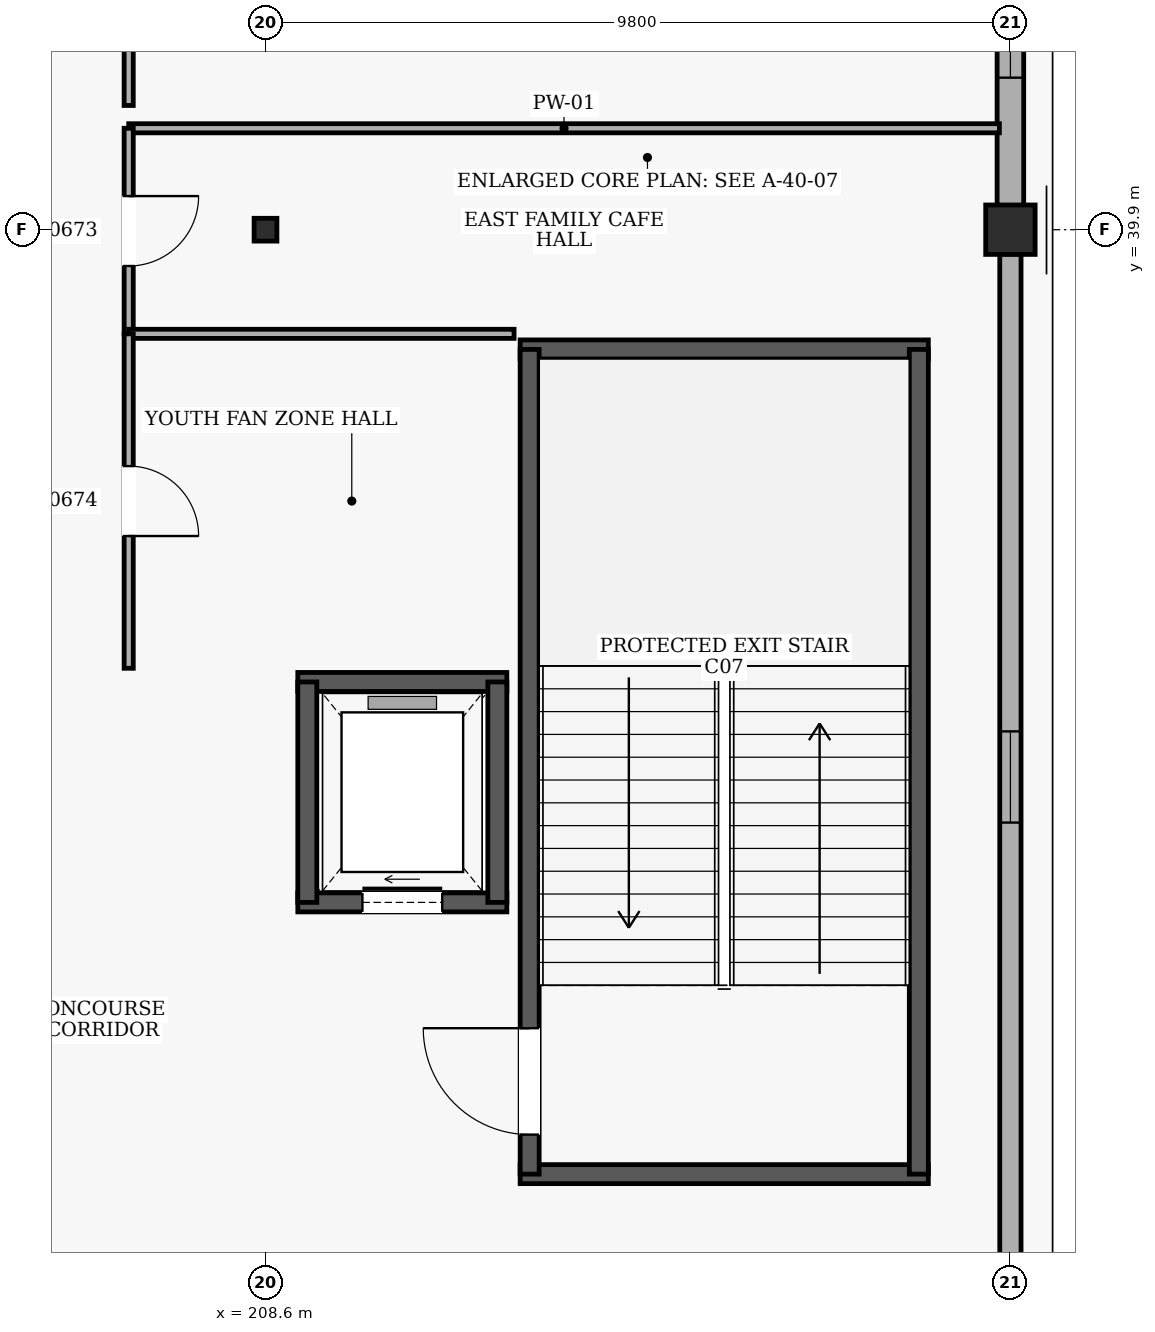
"""IFC4 building model, lengths in metres.
Left out: names, types, materials, properties, quantities, classifications, styles, units other than length and angle.
Written with IfcOpenShell. Run it as: python <this file> out.ifc"""

import sys

from ifc_helpers import new_model, si_unit, direction, frame, frame_2d, origin, origin_2d, place, context, subcontext, project, spatial, rectangle, hollow_rectangle, extrude, element, fill, save


model = new_model("IFC4")
c1 = context("Model", 3, precision=1e-05, world=origin(), true_north=direction((0.0, 1.0)))
c2 = subcontext(c1, "Body", "Model", "MODEL_VIEW")
j1 = project(units=[si_unit("LENGTHUNIT", "METRE"), si_unit("PLANEANGLEUNIT", "RADIAN")], contexts=[c1])
p1 = place(None, origin())
s1 = spatial("IfcSite", under=j1, at=p1, CompositionType="ELEMENT")
p2 = place(p1, origin())
s2 = spatial("IfcBuilding", under=s1, at=p2, CompositionType="ELEMENT")
p3 = place(p2, frame((0.0, 0.0, 15.0)))
s3 = spatial("IfcBuildingStorey", under=s2, at=p3, CompositionType="ELEMENT", Elevation=15.0)
p4 = place(p3, frame((208.6, 39.9, 0.0), z_axis=(0.0, 0.0, 1.0), x_axis=(1.0, 0.0, 0.0)))
e1 = element("IfcColumn", 1, at=p4, inside=s3, PredefinedType="COLUMN", context=c2, shape_type="SweptSolid", body=[
    extrude(hollow_rectangle(XDim=0.3, YDim=0.3, WallThickness=0.016, at=origin_2d()), origin(), (0.0, 0.0, 1.0), 4.8),
])
p5 = place(p3, frame((218.4, 39.9, 0.0), z_axis=(0.0, 0.0, 1.0), x_axis=(1.0, 0.0, 0.0)))
e2 = element("IfcColumn", 2, at=p5, inside=s3, PredefinedType="COLUMN", context=c2, shape_type="SweptSolid", body=[
    extrude(rectangle(XDim=0.65, YDim=0.65, at=origin_2d()), origin(), (0.0, 0.0, 1.0), 4.8),
])
p6 = place(p3, frame((218.4, 46.78, 0.0), z_axis=(0.0, 0.0, 1.0), x_axis=(0.0, -1.0, 0.0)))
e3 = element("IfcWall", 3, at=p6, inside=s3, PredefinedType="SOLIDWALL", context=c2, shape_type="SweptSolid", body=[
    extrude(rectangle(XDim=6.56, YDim=0.35, at=frame_2d((3.28, 0.0))), origin(), (0.0, 0.0, 1.0), 3.88),
])
p7 = place(p6, frame((1.68, 0.0, 0.9)))
e4 = element("IfcOpeningElement", 4, at=p7, cuts=e3, PredefinedType="OPENING", context=c2, shape_type="SweptSolid", body=[
    extrude(rectangle(XDim=3.2, YDim=2.4, at=frame_2d((1.6, 1.2))), frame((0.0, 0.185, 0.0), z_axis=(0.0, -1.0, 0.0), x_axis=(1.0, 0.0, 0.0)), (0.0, 0.0, 1.0), 0.37),
])
p8 = place(p3, frame((218.4, 39.58, 0.0), z_axis=(0.0, 0.0, 1.0), x_axis=(0.0, -1.0, 0.0)))
e5 = element("IfcWall", 5, at=p8, inside=s3, PredefinedType="SOLIDWALL", context=c2, shape_type="SweptSolid", body=[
    extrude(rectangle(XDim=13.76, YDim=0.28, at=frame_2d((6.88, 0.0))), origin(), (0.0, 0.0, 1.0), 3.58),
])
p9 = place(p8, frame((6.28, 0.0, 0.9)))
e6 = element("IfcOpeningElement", 6, at=p9, cuts=e5, PredefinedType="OPENING", context=c2, shape_type="SweptSolid", body=[
    extrude(rectangle(XDim=1.2, YDim=1.5, at=frame_2d((0.6, 0.75))), frame((0.0, 0.15, 0.0), z_axis=(0.0, -1.0, 0.0), x_axis=(1.0, 0.0, 0.0)), (0.0, 0.0, 1.0), 0.3),
])
for number, where, z_axis, x_axis in (
    (7, (211.95, 27.475, 0.0), (0.0, 0.0, 1.0), (1.0, 0.0, 0.0)),
    (8, (217.32, 38.325, 0.0), (0.0, 0.0, 1.0), (-1.0, 0.0, 0.0)),
):
    element("IfcWall", number, at=place(p3, frame(where, z_axis=z_axis, x_axis=x_axis)), inside=s3, PredefinedType="SHEAR", context=c2, shape_type="SweptSolid", body=[
        extrude(rectangle(XDim=5.37, YDim=0.25, at=frame_2d((2.685, 0.0))), origin(), (0.0, 0.0, 1.0), 4.5),
    ])
p10 = place(p3, frame((212.075, 27.475, 0.0), z_axis=(0.0, 0.0, 1.0), x_axis=(0.0, 1.0, 0.0)))
e9 = element("IfcWall", 9, at=p10, inside=s3, PredefinedType="SHEAR", context=c2, shape_type="SweptSolid", body=[
    extrude(rectangle(XDim=10.85, YDim=0.25, at=frame_2d((5.425, 0.0))), origin(), (0.0, 0.0, 1.0), 4.5),
])
p11 = place(p10, frame((0.52, 0.0, 0.0)))
e10 = element("IfcOpeningElement", 10, at=p11, cuts=e9, PredefinedType="OPENING", context=c2, shape_type="SweptSolid", body=[
    extrude(rectangle(XDim=1.4, YDim=2.15, at=frame_2d((0.7, 1.075))), frame((0.0, 0.135, 0.0), z_axis=(0.0, -1.0, 0.0), x_axis=(1.0, 0.0, 0.0)), (0.0, 0.0, 1.0), 0.27),
])
p12 = place(p3, frame((217.195, 27.475, 0.0), z_axis=(0.0, 0.0, 1.0), x_axis=(0.0, 1.0, 0.0)))
e11 = element("IfcWall", 11, at=p12, inside=s3, PredefinedType="SHEAR", context=c2, shape_type="SweptSolid", body=[
    extrude(rectangle(XDim=10.85, YDim=0.25, at=frame_2d((5.425, 0.0))), origin(), (0.0, 0.0, 1.0), 4.5),
])
p13 = place(p3, frame((209.025, 31.05, 0.0), z_axis=(0.0, 0.0, 1.0), x_axis=(1.0, 0.0, 0.0)))
e12 = element("IfcWall", 12, at=p13, inside=s3, PredefinedType="SHEAR", context=c2, shape_type="SweptSolid", body=[
    extrude(rectangle(XDim=2.75, YDim=0.25, at=frame_2d((1.375, 0.0))), origin(), (0.0, 0.0, 1.0), 4.5),
])
p14 = place(p13, frame((0.85, 0.0, 0.0)))
e13 = element("IfcOpeningElement", 13, at=p14, cuts=e12, PredefinedType="OPENING", context=c2, shape_type="SweptSolid", body=[
    extrude(rectangle(XDim=1.05, YDim=2.15, at=frame_2d((0.525, 1.075))), frame((0.0, 0.135, 0.0), z_axis=(0.0, -1.0, 0.0), x_axis=(1.0, 0.0, 0.0)), (0.0, 0.0, 1.0), 0.27),
])
p15 = place(p3, frame((211.775, 33.95, 0.0), z_axis=(0.0, 0.0, 1.0), x_axis=(-1.0, 0.0, 0.0)))
e14 = element("IfcWall", 14, at=p15, inside=s3, PredefinedType="SHEAR", context=c2, shape_type="SweptSolid", body=[
    extrude(rectangle(XDim=2.75, YDim=0.25, at=frame_2d((1.375, 0.0))), origin(), (0.0, 0.0, 1.0), 4.5),
])
for number, where, z_axis, x_axis in (
    (15, (209.15, 33.95, 0.0), (0.0, 0.0, 1.0), (0.0, -1.0, 0.0)),
    (16, (211.65, 31.05, 0.0), (0.0, 0.0, 1.0), (0.0, 1.0, 0.0)),
):
    element("IfcWall", number, at=place(p3, frame(where, z_axis=z_axis, x_axis=x_axis)), inside=s3, PredefinedType="SHEAR", context=c2, shape_type="SweptSolid", body=[
        extrude(rectangle(XDim=2.9, YDim=0.25, at=frame_2d((1.45, 0.0))), origin(), (0.0, 0.0, 1.0), 4.5),
    ])
p16 = place(p3, frame((218.255, 41.234, 0.0), z_axis=(0.0, 0.0, 1.0), x_axis=(-1.0, 0.0, 0.0)))
e17 = element("IfcWall", 17, at=p16, inside=s3, PredefinedType="PARTITIONING", context=c2, shape_type="SweptSolid", body=[
    extrude(rectangle(XDim=11.455, YDim=0.12, at=frame_2d((5.728, 0.0))), origin(), (0.0, 0.0, 1.0), 4.5),
])
p17 = place(p3, frame((206.8, 41.234, 0.0), z_axis=(0.0, 0.0, 1.0), x_axis=(0.0, -1.0, 0.0)))
e18 = element("IfcWall", 18, at=p17, inside=s3, PredefinedType="PARTITIONING", context=c2, shape_type="SweptSolid", body=[
    extrude(rectangle(XDim=2.704, YDim=0.12, at=frame_2d((1.352, 0.0))), origin(), (0.0, 0.0, 1.0), 4.5),
])
p18 = place(p17, frame((0.892, 0.0, 0.0)))
e19 = element("IfcOpeningElement", 19, at=p18, cuts=e18, PredefinedType="OPENING", context=c2, shape_type="SweptSolid", body=[
    extrude(rectangle(XDim=0.92, YDim=2.1, at=frame_2d((0.46, 1.05))), frame((0.0, 0.07, 0.0), z_axis=(0.0, -1.0, 0.0), x_axis=(1.0, 0.0, 0.0)), (0.0, 0.0, 1.0), 0.14),
])
p19 = place(p3, frame((211.87, 38.53, 0.0), z_axis=(0.0, 0.0, 1.0), x_axis=(-1.0, 0.0, 0.0)))
e20 = element("IfcWall", 20, at=p19, inside=s3, PredefinedType="PARTITIONING", context=c2, shape_type="SweptSolid", body=[
    extrude(rectangle(XDim=5.07, YDim=0.12, at=frame_2d((2.535, 0.0))), origin(), (0.0, 0.0, 1.0), 4.5),
])
p20 = place(p3, frame((206.8, 38.53, 0.0), z_axis=(0.0, 0.0, 1.0), x_axis=(0.0, -1.0, 0.0)))
e21 = element("IfcWall", 21, at=p20, inside=s3, PredefinedType="PARTITIONING", context=c2, shape_type="SweptSolid", body=[
    extrude(rectangle(XDim=4.4, YDim=0.12, at=frame_2d((2.2, 0.0))), origin(), (0.0, 0.0, 1.0), 4.5),
])
p21 = place(p20, frame((1.74, 0.0, 0.0)))
e22 = element("IfcOpeningElement", 22, at=p21, cuts=e21, PredefinedType="OPENING", context=c2, shape_type="SweptSolid", body=[
    extrude(rectangle(XDim=0.92, YDim=2.1, at=frame_2d((0.46, 1.05))), frame((0.0, 0.07, 0.0), z_axis=(0.0, -1.0, 0.0), x_axis=(1.0, 0.0, 0.0)), (0.0, 0.0, 1.0), 0.14),
])
p22 = place(p3, frame((206.8, 54.03, 0.0), z_axis=(0.0, 0.0, 1.0), x_axis=(0.0, -1.0, 0.0)))
e23 = element("IfcWall", 23, at=p22, inside=s3, PredefinedType="PARTITIONING", context=c2, shape_type="SweptSolid", body=[
    extrude(rectangle(XDim=12.496, YDim=0.12, at=frame_2d((6.248, 0.0))), origin(), (0.0, 0.0, 1.0), 4.5),
])
p23 = place(p22, frame((4.901, 0.0, 0.0)))
e24 = element("IfcOpeningElement", 24, at=p23, cuts=e23, PredefinedType="OPENING", context=c2, shape_type="SweptSolid", body=[
    extrude(rectangle(XDim=0.96, YDim=2.1, at=frame_2d((0.48, 1.05))), frame((0.0, 0.07, 0.0), z_axis=(0.0, -1.0, 0.0), x_axis=(1.0, 0.0, 0.0)), (0.0, 0.0, 1.0), 0.14),
])
p24 = place(p7, origin())
e25 = element("IfcWindow", 25, at=p24, inside=s3, PartitioningType="SINGLE_PANEL", PredefinedType="WINDOW", context=c2, shape_type="SweptSolid", body=[
    extrude(rectangle(XDim=3.2, YDim=2.4, at=frame_2d((1.6, 1.2))), frame((0.0, 0.03, 0.0), z_axis=(0.0, -1.0, 0.0), x_axis=(1.0, 0.0, 0.0)), (0.0, 0.0, 1.0), 0.06),
])
fill(e4, e25)
p25 = place(p9, origin())
e26 = element("IfcWindow", 26, at=p25, inside=s3, PartitioningType="SINGLE_PANEL", PredefinedType="WINDOW", context=c2, shape_type="SweptSolid", body=[
    extrude(rectangle(XDim=1.2, YDim=1.5, at=frame_2d((0.6, 0.75))), frame((0.0, 0.03, 0.0), z_axis=(0.0, -1.0, 0.0), x_axis=(1.0, 0.0, 0.0)), (0.0, 0.0, 1.0), 0.06),
])
fill(e6, e26)
p26 = place(p11, frame((1.4, 0.0, 0.0), z_axis=(0.0, 0.0, 1.0), x_axis=(-1.0, 0.0, 0.0)))
e27 = element("IfcDoor", 27, at=p26, inside=s3, OperationType="SINGLE_SWING_LEFT", PredefinedType="DOOR", context=c2, shape_type="SweptSolid", body=[
    extrude(rectangle(XDim=1.4, YDim=2.15, at=frame_2d((0.7, 1.075))), frame((0.0, 0.025, 0.0), z_axis=(0.0, -1.0, 0.0), x_axis=(1.0, 0.0, 0.0)), (0.0, 0.0, 1.0), 0.05),
])
fill(e10, e27)
p27 = place(p14, origin())
e28 = element("IfcDoor", 28, at=p27, inside=s3, OperationType="SLIDING_TO_RIGHT", PredefinedType="DOOR", context=c2, shape_type="SweptSolid", body=[
    extrude(rectangle(XDim=1.05, YDim=2.15, at=frame_2d((0.525, 1.075))), frame((0.0, 0.025, 0.0), z_axis=(0.0, -1.0, 0.0), x_axis=(1.0, 0.0, 0.0)), (0.0, 0.0, 1.0), 0.05),
])
fill(e13, e28)
p28 = place(p18, origin())
e29 = element("IfcDoor", 29, at=p28, inside=s3, OperationType="SINGLE_SWING_LEFT", PredefinedType="DOOR", context=c2, shape_type="SweptSolid", body=[
    extrude(rectangle(XDim=0.92, YDim=2.1, at=frame_2d((0.46, 1.05))), frame((0.0, 0.025, 0.0), z_axis=(0.0, -1.0, 0.0), x_axis=(1.0, 0.0, 0.0)), (0.0, 0.0, 1.0), 0.05),
])
fill(e19, e29)
p29 = place(p21, origin())
e30 = element("IfcDoor", 30, at=p29, inside=s3, OperationType="SINGLE_SWING_RIGHT", PredefinedType="DOOR", context=c2, shape_type="SweptSolid", body=[
    extrude(rectangle(XDim=0.92, YDim=2.1, at=frame_2d((0.46, 1.05))), frame((0.0, 0.025, 0.0), z_axis=(0.0, -1.0, 0.0), x_axis=(1.0, 0.0, 0.0)), (0.0, 0.0, 1.0), 0.05),
])
fill(e22, e30)
save(model, sys.argv[1])
